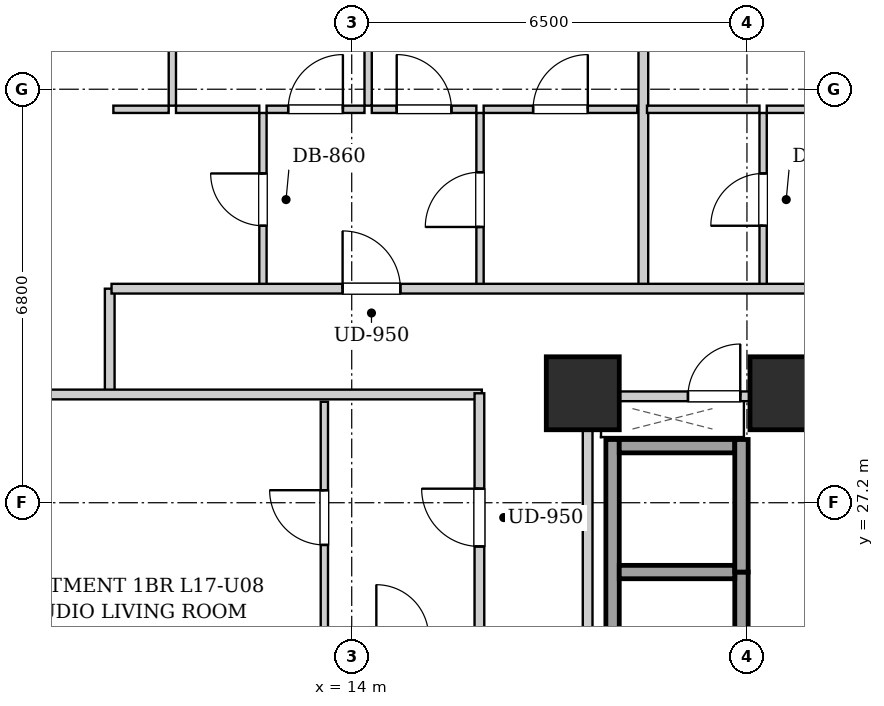
"""IFC4 building model, lengths in metres.
Left out: names, types, materials, properties, quantities, classifications, styles, units other than length and angle.
Written with IfcOpenShell. Run it as: python <this file> out.ifc"""

import sys

from ifc_helpers import new_model, si_unit, direction, frame, frame_2d, origin, origin_2d, place, context, subcontext, project, spatial, rectangle, extrude, element, fill, save


model = new_model("IFC4")
c1 = context("Model", 3, precision=1e-05, world=origin(), true_north=direction((0.0, 1.0)))
c2 = subcontext(c1, "Body", "Model", "MODEL_VIEW")
j1 = project(units=[si_unit("LENGTHUNIT", "METRE"), si_unit("PLANEANGLEUNIT", "RADIAN")], contexts=[c1])
p1 = place(None, origin())
s1 = spatial("IfcSite", under=j1, at=p1, CompositionType="ELEMENT")
p2 = place(p1, origin())
s2 = spatial("IfcBuilding", under=s1, at=p2, CompositionType="ELEMENT")
p3 = place(p2, frame((0.0, 0.0, 64.2)))
s3 = spatial("IfcBuildingStorey", under=s2, at=p3, CompositionType="ELEMENT", Elevation=64.2)
for number, where, z_axis, x_axis in (
    (1, (17.8, 29.0, 0.0), (0.0, 0.0, 1.0), (1.0, 0.0, 0.0)),
    (2, (21.15, 29.0, 0.0), (0.0, 0.0, 1.0), (1.0, 0.0, 0.0)),
):
    element("IfcColumn", number, at=place(p3, frame(where, z_axis=z_axis, x_axis=x_axis)), inside=s3, PredefinedType="COLUMN", context=c2, shape_type="SweptSolid", body=[
        extrude(rectangle(XDim=1.2, YDim=1.2, at=origin_2d()), origin(), (0.0, 0.0, 1.0), 3.2),
    ])
p4 = place(p3, frame((18.29, 24.1, 0.0), z_axis=(0.0, 0.0, 1.0), x_axis=(0.0, 1.0, 0.0)))
e3 = element("IfcWall", 3, at=p4, inside=s3, PredefinedType="SHEAR", context=c2, shape_type="SweptSolid", body=[
    extrude(rectangle(XDim=4.14, YDim=0.22, at=frame_2d((2.07, 0.0))), origin(), (0.0, 0.0, 1.0), 2.94),
])
p5 = place(p3, frame((20.41, 24.1, 0.0), z_axis=(0.0, 0.0, 1.0), x_axis=(0.0, 1.0, 0.0)))
e4 = element("IfcWall", 4, at=p5, inside=s3, PredefinedType="SHEAR", context=c2, shape_type="SweptSolid", body=[
    extrude(rectangle(XDim=1.96, YDim=0.22, at=frame_2d((0.98, 0.0))), origin(), (0.0, 0.0, 1.0), 2.94),
])
for number, where, z_axis, x_axis in (
    (5, (18.4, 26.06, 0.0), (0.0, 0.0, 1.0), (1.0, 0.0, 0.0)),
    (6, (18.4, 28.13, 0.0), (0.0, 0.0, 1.0), (1.0, 0.0, 0.0)),
):
    element("IfcWall", number, at=place(p3, frame(where, z_axis=z_axis, x_axis=x_axis)), inside=s3, PredefinedType="SHEAR", context=c2, shape_type="SweptSolid", body=[
        extrude(rectangle(XDim=1.9, YDim=0.22, at=frame_2d((0.95, 0.0))), origin(), (0.0, 0.0, 1.0), 2.94),
    ])
p6 = place(p3, frame((20.41, 26.06, 0.0), z_axis=(0.0, 0.0, 1.0), x_axis=(0.0, 1.0, 0.0)))
e7 = element("IfcWall", 7, at=p6, inside=s3, PredefinedType="SHEAR", context=c2, shape_type="SweptSolid", body=[
    extrude(rectangle(XDim=2.18, YDim=0.22, at=frame_2d((1.09, 0.0))), origin(), (0.0, 0.0, 1.0), 2.94),
])
p7 = place(p3, frame((17.88, 24.12, 0.0), z_axis=(0.0, 0.0, 1.0), x_axis=(0.0, 1.0, 0.0)))
e8 = element("IfcWall", 8, at=p7, inside=s3, PredefinedType="PARTITIONING", context=c2, shape_type="SweptSolid", body=[
    extrude(rectangle(XDim=4.76, YDim=0.16, at=frame_2d((2.38, 0.0))), origin(), (0.0, 0.0, 1.0), 2.94),
])
p8 = place(p3, frame((17.96, 28.95, 0.0), z_axis=(0.0, 0.0, 1.0), x_axis=(1.0, 0.0, 0.0)))
e9 = element("IfcWall", 9, at=p8, inside=s3, PredefinedType="PARTITIONING", context=c2, shape_type="SweptSolid", body=[
    extrude(rectangle(XDim=4.29, YDim=0.16, at=frame_2d((2.145, 0.0))), origin(), (0.0, 0.0, 1.0), 2.232),
])
p9 = place(p8, frame((1.57, 0.0, 0.0)))
e10 = element("IfcOpeningElement", 10, at=p9, cuts=e9, PredefinedType="OPENING", context=c2, shape_type="SweptSolid", body=[
    extrude(rectangle(XDim=0.86, YDim=2.05, at=frame_2d((0.43, 1.025))), frame((0.0, 0.09, 0.0), z_axis=(0.0, -1.0, 0.0), x_axis=(1.0, 0.0, 0.0)), (0.0, 0.0, 1.0), 0.18),
])
p10 = place(p3, frame((10.02, 28.98, 0.0), z_axis=(0.0, 0.0, 1.0), x_axis=(0.0, 1.0, 0.0)))
e11 = element("IfcWall", 11, at=p10, inside=s3, PredefinedType="PARTITIONING", context=c2, shape_type="SweptSolid", body=[
    extrude(rectangle(XDim=1.74, YDim=0.16, at=frame_2d((0.87, 0.0))), origin(), (0.0, 0.0, 1.0), 2.94),
])
p11 = place(p3, frame((7.78, 28.98, 0.0), z_axis=(0.0, 0.0, 1.0), x_axis=(1.0, 0.0, 0.0)))
e12 = element("IfcWall", 12, at=p11, inside=s3, PredefinedType="PARTITIONING", context=c2, shape_type="SweptSolid", body=[
    extrude(rectangle(XDim=8.36, YDim=0.16, at=frame_2d((4.18, 0.0))), origin(), (0.0, 0.0, 1.0), 2.232),
])
p12 = place(p3, frame((12.54, 30.76, 0.0), z_axis=(0.0, 0.0, 1.0), x_axis=(0.0, 1.0, 0.0)))
e13 = element("IfcWall", 13, at=p12, inside=s3, PredefinedType="PARTITIONING", context=c2, shape_type="SweptSolid", body=[
    extrude(rectangle(XDim=2.85, YDim=0.12, at=frame_2d((1.425, 0.0))), origin(), (0.0, 0.0, 1.0), 2.94),
])
p13 = place(p12, frame((0.995, 0.0, 0.0)))
e14 = element("IfcOpeningElement", 14, at=p13, cuts=e13, PredefinedType="OPENING", context=c2, shape_type="SweptSolid", body=[
    extrude(rectangle(XDim=0.86, YDim=2.05, at=frame_2d((0.43, 1.025))), frame((0.0, 0.07, 0.0), z_axis=(0.0, -1.0, 0.0), x_axis=(1.0, 0.0, 0.0)), (0.0, 0.0, 1.0), 0.14),
])
p14 = place(p3, frame((10.08, 33.67, 0.0), z_axis=(0.0, 0.0, 1.0), x_axis=(1.0, 0.0, 0.0)))
e15 = element("IfcWall", 15, at=p14, inside=s3, PredefinedType="PARTITIONING", context=c2, shape_type="SweptSolid", body=[
    extrude(rectangle(XDim=0.91, YDim=0.12, at=frame_2d((0.455, 0.0))), origin(), (0.0, 0.0, 1.0), 2.94),
])
p15 = place(p3, frame((11.11, 33.67, 0.0), z_axis=(0.0, 0.0, 1.0), x_axis=(1.0, 0.0, 0.0)))
e16 = element("IfcWall", 16, at=p15, inside=s3, PredefinedType="PARTITIONING", context=c2, shape_type="SweptSolid", body=[
    extrude(rectangle(XDim=1.37, YDim=0.12, at=frame_2d((0.685, 0.0))), origin(), (0.0, 0.0, 1.0), 2.94),
])
p16 = place(p3, frame((16.11, 30.76, 0.0), z_axis=(0.0, 0.0, 1.0), x_axis=(0.0, 1.0, 0.0)))
e17 = element("IfcWall", 17, at=p16, inside=s3, PredefinedType="PARTITIONING", context=c2, shape_type="SweptSolid", body=[
    extrude(rectangle(XDim=2.85, YDim=0.12, at=frame_2d((1.425, 0.0))), origin(), (0.0, 0.0, 1.0), 2.94),
])
p17 = place(p16, frame((0.975, 0.0, 0.0)))
e18 = element("IfcOpeningElement", 18, at=p17, cuts=e17, PredefinedType="OPENING", context=c2, shape_type="SweptSolid", body=[
    extrude(rectangle(XDim=0.9, YDim=2.05, at=frame_2d((0.45, 1.025))), frame((0.0, 0.07, 0.0), z_axis=(0.0, -1.0, 0.0), x_axis=(1.0, 0.0, 0.0)), (0.0, 0.0, 1.0), 0.14),
])
p18 = place(p3, frame((12.6, 33.67, 0.0), z_axis=(0.0, 0.0, 1.0), x_axis=(1.0, 0.0, 0.0)))
e19 = element("IfcWall", 19, at=p18, inside=s3, PredefinedType="PARTITIONING", context=c2, shape_type="SweptSolid", body=[
    extrude(rectangle(XDim=1.61, YDim=0.12, at=frame_2d((0.805, 0.0))), origin(), (0.0, 0.0, 1.0), 2.94),
])
p19 = place(p18, frame((0.355, 0.0, 0.0)))
e20 = element("IfcOpeningElement", 20, at=p19, cuts=e19, PredefinedType="OPENING", context=c2, shape_type="SweptSolid", body=[
    extrude(rectangle(XDim=0.9, YDim=2.05, at=frame_2d((0.45, 1.025))), frame((0.0, 0.07, 0.0), z_axis=(0.0, -1.0, 0.0), x_axis=(1.0, 0.0, 0.0)), (0.0, 0.0, 1.0), 0.14),
])
p20 = place(p3, frame((14.33, 33.67, 0.0), z_axis=(0.0, 0.0, 1.0), x_axis=(1.0, 0.0, 0.0)))
e21 = element("IfcWall", 21, at=p20, inside=s3, PredefinedType="PARTITIONING", context=c2, shape_type="SweptSolid", body=[
    extrude(rectangle(XDim=1.72, YDim=0.12, at=frame_2d((0.86, 0.0))), origin(), (0.0, 0.0, 1.0), 2.94),
])
p21 = place(p20, frame((0.41, 0.0, 0.0)))
e22 = element("IfcOpeningElement", 22, at=p21, cuts=e21, PredefinedType="OPENING", context=c2, shape_type="SweptSolid", body=[
    extrude(rectangle(XDim=0.9, YDim=2.05, at=frame_2d((0.45, 1.025))), frame((0.0, 0.07, 0.0), z_axis=(0.0, -1.0, 0.0), x_axis=(1.0, 0.0, 0.0)), (0.0, 0.0, 1.0), 0.14),
])
p22 = place(p3, frame((16.17, 33.67, 0.0), z_axis=(0.0, 0.0, 1.0), x_axis=(1.0, 0.0, 0.0)))
e23 = element("IfcWall", 23, at=p22, inside=s3, PredefinedType="PARTITIONING", context=c2, shape_type="SweptSolid", body=[
    extrude(rectangle(XDim=2.526, YDim=0.12, at=frame_2d((1.263, 0.0))), origin(), (0.0, 0.0, 1.0), 2.94),
])
p23 = place(p22, frame((0.813, 0.0, 0.0)))
e24 = element("IfcOpeningElement", 24, at=p23, cuts=e23, PredefinedType="OPENING", context=c2, shape_type="SweptSolid", body=[
    extrude(rectangle(XDim=0.9, YDim=2.05, at=frame_2d((0.45, 1.025))), frame((0.0, 0.07, 0.0), z_axis=(0.0, -1.0, 0.0), x_axis=(1.0, 0.0, 0.0)), (0.0, 0.0, 1.0), 0.14),
])
p24 = place(p3, frame((11.05, 33.73, 0.0), z_axis=(0.0, 0.0, 1.0), x_axis=(0.0, 1.0, 0.0)))
e25 = element("IfcWall", 25, at=p24, inside=s3, PredefinedType="PARTITIONING", context=c2, shape_type="SweptSolid", body=[
    extrude(rectangle(XDim=13.59, YDim=0.12, at=frame_2d((6.795, 0.0))), origin(), (0.0, 0.0, 1.0), 2.94),
])
p25 = place(p24, frame((6.33, 0.0, 0.0)))
e26 = element("IfcOpeningElement", 26, at=p25, cuts=e25, PredefinedType="OPENING", context=c2, shape_type="SweptSolid", body=[
    extrude(rectangle(XDim=0.9, YDim=2.05, at=frame_2d((0.45, 1.025))), frame((0.0, 0.07, 0.0), z_axis=(0.0, -1.0, 0.0), x_axis=(1.0, 0.0, 0.0)), (0.0, 0.0, 1.0), 0.14),
])
p26 = place(p3, frame((14.27, 33.73, 0.0), z_axis=(0.0, 0.0, 1.0), x_axis=(0.0, 1.0, 0.0)))
e27 = element("IfcWall", 27, at=p26, inside=s3, PredefinedType="PARTITIONING", context=c2, shape_type="SweptSolid", body=[
    extrude(rectangle(XDim=13.59, YDim=0.12, at=frame_2d((6.795, 0.0))), origin(), (0.0, 0.0, 1.0), 2.94),
])
p27 = place(p26, frame((6.33, 0.0, 0.0)))
e28 = element("IfcOpeningElement", 28, at=p27, cuts=e27, PredefinedType="OPENING", context=c2, shape_type="SweptSolid", body=[
    extrude(rectangle(XDim=0.9, YDim=2.05, at=frame_2d((0.45, 1.025))), frame((0.0, 0.07, 0.0), z_axis=(0.0, -1.0, 0.0), x_axis=(1.0, 0.0, 0.0)), (0.0, 0.0, 1.0), 0.14),
])
p28 = place(p3, frame((18.796, 30.76, 0.0), z_axis=(0.0, 0.0, 1.0), x_axis=(0.0, 1.0, 0.0)))
e29 = element("IfcWall", 29, at=p28, inside=s3, PredefinedType="PARTITIONING", context=c2, shape_type="SweptSolid", body=[
    extrude(rectangle(XDim=16.56, YDim=0.16, at=frame_2d((8.28, 0.0))), origin(), (0.0, 0.0, 1.0), 2.94),
])
p29 = place(p3, frame((20.766, 30.76, 0.0), z_axis=(0.0, 0.0, 1.0), x_axis=(0.0, 1.0, 0.0)))
e30 = element("IfcWall", 30, at=p29, inside=s3, PredefinedType="PARTITIONING", context=c2, shape_type="SweptSolid", body=[
    extrude(rectangle(XDim=2.85, YDim=0.12, at=frame_2d((1.425, 0.0))), origin(), (0.0, 0.0, 1.0), 2.94),
])
p30 = place(p29, frame((0.995, 0.0, 0.0)))
e31 = element("IfcOpeningElement", 31, at=p30, cuts=e30, PredefinedType="OPENING", context=c2, shape_type="SweptSolid", body=[
    extrude(rectangle(XDim=0.86, YDim=2.05, at=frame_2d((0.43, 1.025))), frame((0.0, 0.07, 0.0), z_axis=(0.0, -1.0, 0.0), x_axis=(1.0, 0.0, 0.0)), (0.0, 0.0, 1.0), 0.14),
])
p31 = place(p3, frame((18.856, 33.67, 0.0), z_axis=(0.0, 0.0, 1.0), x_axis=(1.0, 0.0, 0.0)))
e32 = element("IfcWall", 32, at=p31, inside=s3, PredefinedType="PARTITIONING", context=c2, shape_type="SweptSolid", body=[
    extrude(rectangle(XDim=1.85, YDim=0.12, at=frame_2d((0.925, 0.0))), origin(), (0.0, 0.0, 1.0), 2.94),
])
p32 = place(p3, frame((20.826, 33.67, 0.0), z_axis=(0.0, 0.0, 1.0), x_axis=(1.0, 0.0, 0.0)))
e33 = element("IfcWall", 33, at=p32, inside=s3, PredefinedType="PARTITIONING", context=c2, shape_type="SweptSolid", body=[
    extrude(rectangle(XDim=3.353, YDim=0.12, at=frame_2d((1.677, 0.0))), origin(), (0.0, 0.0, 1.0), 2.94),
])
p33 = place(p32, frame((1.226, 0.0, 0.0)))
e34 = element("IfcOpeningElement", 34, at=p33, cuts=e33, PredefinedType="OPENING", context=c2, shape_type="SweptSolid", body=[
    extrude(rectangle(XDim=0.9, YDim=2.05, at=frame_2d((0.45, 1.025))), frame((0.0, 0.07, 0.0), z_axis=(0.0, -1.0, 0.0), x_axis=(1.0, 0.0, 0.0)), (0.0, 0.0, 1.0), 0.14),
])
p34 = place(p3, frame((13.55, 25.052, 0.0), z_axis=(0.0, 0.0, 1.0), x_axis=(0.0, 1.0, 0.0)))
e35 = element("IfcWall", 35, at=p34, inside=s3, PredefinedType="PARTITIONING", context=c2, shape_type="SweptSolid", body=[
    extrude(rectangle(XDim=3.808, YDim=0.12, at=frame_2d((1.904, 0.0))), origin(), (0.0, 0.0, 1.0), 2.94),
])
p35 = place(p34, frame((1.454, 0.0, 0.0)))
e36 = element("IfcOpeningElement", 36, at=p35, cuts=e35, PredefinedType="OPENING", context=c2, shape_type="SweptSolid", body=[
    extrude(rectangle(XDim=0.9, YDim=2.05, at=frame_2d((0.45, 1.025))), frame((0.0, 0.07, 0.0), z_axis=(0.0, -1.0, 0.0), x_axis=(1.0, 0.0, 0.0)), (0.0, 0.0, 1.0), 0.14),
])
p36 = place(p3, frame((10.05, 30.72, 0.0), z_axis=(0.0, 0.0, 1.0), x_axis=(1.0, 0.0, 0.0)))
e37 = element("IfcWall", 37, at=p36, inside=s3, PredefinedType="PARTITIONING", context=c2, shape_type="SweptSolid", body=[
    extrude(rectangle(XDim=33.9, YDim=0.16, at=frame_2d((16.95, 0.0))), origin(), (0.0, 0.0, 1.0), 2.94),
])
p37 = place(p36, frame((3.8, 0.0, 0.0)))
e38 = element("IfcOpeningElement", 38, at=p37, cuts=e37, PredefinedType="OPENING", context=c2, shape_type="SweptSolid", body=[
    extrude(rectangle(XDim=0.95, YDim=2.1, at=frame_2d((0.475, 1.05))), frame((0.0, 0.09, 0.0), z_axis=(0.0, -1.0, 0.0), x_axis=(1.0, 0.0, 0.0)), (0.0, 0.0, 1.0), 0.18),
])
p38 = place(p36, frame((11.977, 0.0, 0.0)))
e39 = element("IfcOpeningElement", 39, at=p38, cuts=e37, PredefinedType="OPENING", context=c2, shape_type="SweptSolid", body=[
    extrude(rectangle(XDim=0.95, YDim=2.1, at=frame_2d((0.475, 1.05))), frame((0.0, 0.09, 0.0), z_axis=(0.0, -1.0, 0.0), x_axis=(1.0, 0.0, 0.0)), (0.0, 0.0, 1.0), 0.18),
])
p39 = place(p36, frame((18.09, 0.0, 0.0)))
e40 = element("IfcOpeningElement", 40, at=p39, cuts=e37, PredefinedType="OPENING", context=c2, shape_type="SweptSolid", body=[
    extrude(rectangle(XDim=0.95, YDim=2.1, at=frame_2d((0.475, 1.05))), frame((0.0, 0.09, 0.0), z_axis=(0.0, -1.0, 0.0), x_axis=(1.0, 0.0, 0.0)), (0.0, 0.0, 1.0), 0.18),
])
p40 = place(p36, frame((31.525, 0.0, 0.0)))
e41 = element("IfcOpeningElement", 41, at=p40, cuts=e37, PredefinedType="OPENING", context=c2, shape_type="SweptSolid", body=[
    extrude(rectangle(XDim=0.95, YDim=2.1, at=frame_2d((0.475, 1.05))), frame((0.0, 0.09, 0.0), z_axis=(0.0, -1.0, 0.0), x_axis=(1.0, 0.0, 0.0)), (0.0, 0.0, 1.0), 0.18),
])
p41 = place(p3, frame((16.1, 15.07, 0.0), z_axis=(0.0, 0.0, 1.0), x_axis=(0.0, 1.0, 0.0)))
e42 = element("IfcWall", 42, at=p41, inside=s3, PredefinedType="PARTITIONING", context=c2, shape_type="SweptSolid", body=[
    extrude(rectangle(XDim=13.93, YDim=0.16, at=frame_2d((6.965, 0.0))), origin(), (0.0, 0.0, 1.0), 2.94),
])
p42 = place(p41, frame((4.661, 0.0, 0.0)))
e43 = element("IfcOpeningElement", 43, at=p42, cuts=e42, PredefinedType="OPENING", context=c2, shape_type="SweptSolid", body=[
    extrude(rectangle(XDim=0.95, YDim=2.1, at=frame_2d((0.475, 1.05))), frame((0.0, 0.09, 0.0), z_axis=(0.0, -1.0, 0.0), x_axis=(1.0, 0.0, 0.0)), (0.0, 0.0, 1.0), 0.18),
])
p43 = place(p41, frame((11.411, 0.0, 0.0)))
e44 = element("IfcOpeningElement", 44, at=p43, cuts=e42, PredefinedType="OPENING", context=c2, shape_type="SweptSolid", body=[
    extrude(rectangle(XDim=0.95, YDim=2.1, at=frame_2d((0.475, 1.05))), frame((0.0, 0.09, 0.0), z_axis=(0.0, -1.0, 0.0), x_axis=(1.0, 0.0, 0.0)), (0.0, 0.0, 1.0), 0.18),
])
p44 = place(p9, origin())
e45 = element("IfcDoor", 45, at=p44, inside=s3, OperationType="SINGLE_SWING_RIGHT", PredefinedType="DOOR", context=c2, shape_type="SweptSolid", body=[
    extrude(rectangle(XDim=0.86, YDim=2.05, at=frame_2d((0.43, 1.025))), frame((0.0, 0.025, 0.0), z_axis=(0.0, -1.0, 0.0), x_axis=(1.0, 0.0, 0.0)), (0.0, 0.0, 1.0), 0.05),
])
fill(e10, e45)
p45 = place(p13, origin())
e46 = element("IfcDoor", 46, at=p45, inside=s3, OperationType="SINGLE_SWING_RIGHT", PredefinedType="DOOR", context=c2, shape_type="SweptSolid", body=[
    extrude(rectangle(XDim=0.86, YDim=2.05, at=frame_2d((0.43, 1.025))), frame((0.0, 0.025, 0.0), z_axis=(0.0, -1.0, 0.0), x_axis=(1.0, 0.0, 0.0)), (0.0, 0.0, 1.0), 0.05),
])
fill(e14, e46)
p46 = place(p17, origin())
e47 = element("IfcDoor", 47, at=p46, inside=s3, OperationType="SINGLE_SWING_LEFT", PredefinedType="DOOR", context=c2, shape_type="SweptSolid", body=[
    extrude(rectangle(XDim=0.9, YDim=2.05, at=frame_2d((0.45, 1.025))), frame((0.0, 0.025, 0.0), z_axis=(0.0, -1.0, 0.0), x_axis=(1.0, 0.0, 0.0)), (0.0, 0.0, 1.0), 0.05),
])
fill(e18, e47)
p47 = place(p19, origin())
e48 = element("IfcDoor", 48, at=p47, inside=s3, OperationType="SINGLE_SWING_RIGHT", PredefinedType="DOOR", context=c2, shape_type="SweptSolid", body=[
    extrude(rectangle(XDim=0.9, YDim=2.05, at=frame_2d((0.45, 1.025))), frame((0.0, 0.025, 0.0), z_axis=(0.0, -1.0, 0.0), x_axis=(1.0, 0.0, 0.0)), (0.0, 0.0, 1.0), 0.05),
])
fill(e20, e48)
p48 = place(p21, origin())
e49 = element("IfcDoor", 49, at=p48, inside=s3, OperationType="SINGLE_SWING_LEFT", PredefinedType="DOOR", context=c2, shape_type="SweptSolid", body=[
    extrude(rectangle(XDim=0.9, YDim=2.05, at=frame_2d((0.45, 1.025))), frame((0.0, 0.025, 0.0), z_axis=(0.0, -1.0, 0.0), x_axis=(1.0, 0.0, 0.0)), (0.0, 0.0, 1.0), 0.05),
])
fill(e22, e49)
p49 = place(p23, origin())
e50 = element("IfcDoor", 50, at=p49, inside=s3, OperationType="SINGLE_SWING_RIGHT", PredefinedType="DOOR", context=c2, shape_type="SweptSolid", body=[
    extrude(rectangle(XDim=0.9, YDim=2.05, at=frame_2d((0.45, 1.025))), frame((0.0, 0.025, 0.0), z_axis=(0.0, -1.0, 0.0), x_axis=(1.0, 0.0, 0.0)), (0.0, 0.0, 1.0), 0.05),
])
fill(e24, e50)
p50 = place(p30, origin())
e51 = element("IfcDoor", 51, at=p50, inside=s3, OperationType="SINGLE_SWING_LEFT", PredefinedType="DOOR", context=c2, shape_type="SweptSolid", body=[
    extrude(rectangle(XDim=0.86, YDim=2.05, at=frame_2d((0.43, 1.025))), frame((0.0, 0.025, 0.0), z_axis=(0.0, -1.0, 0.0), x_axis=(1.0, 0.0, 0.0)), (0.0, 0.0, 1.0), 0.05),
])
fill(e31, e51)
p51 = place(p35, origin())
e52 = element("IfcDoor", 52, at=p51, inside=s3, OperationType="SINGLE_SWING_RIGHT", PredefinedType="DOOR", context=c2, shape_type="SweptSolid", body=[
    extrude(rectangle(XDim=0.9, YDim=2.05, at=frame_2d((0.45, 1.025))), frame((0.0, 0.025, 0.0), z_axis=(0.0, -1.0, 0.0), x_axis=(1.0, 0.0, 0.0)), (0.0, 0.0, 1.0), 0.05),
])
fill(e36, e52)
p52 = place(p37, origin())
e53 = element("IfcDoor", 53, at=p52, inside=s3, OperationType="SINGLE_SWING_LEFT", PredefinedType="DOOR", context=c2, shape_type="SweptSolid", body=[
    extrude(rectangle(XDim=0.95, YDim=2.1, at=frame_2d((0.475, 1.05))), frame((0.0, 0.025, 0.0), z_axis=(0.0, -1.0, 0.0), x_axis=(1.0, 0.0, 0.0)), (0.0, 0.0, 1.0), 0.05),
])
fill(e38, e53)
p53 = place(p43, origin())
e54 = element("IfcDoor", 54, at=p53, inside=s3, OperationType="SINGLE_SWING_RIGHT", PredefinedType="DOOR", context=c2, shape_type="SweptSolid", body=[
    extrude(rectangle(XDim=0.95, YDim=2.1, at=frame_2d((0.475, 1.05))), frame((0.0, 0.025, 0.0), z_axis=(0.0, -1.0, 0.0), x_axis=(1.0, 0.0, 0.0)), (0.0, 0.0, 1.0), 0.05),
])
fill(e44, e54)
save(model, sys.argv[1])
